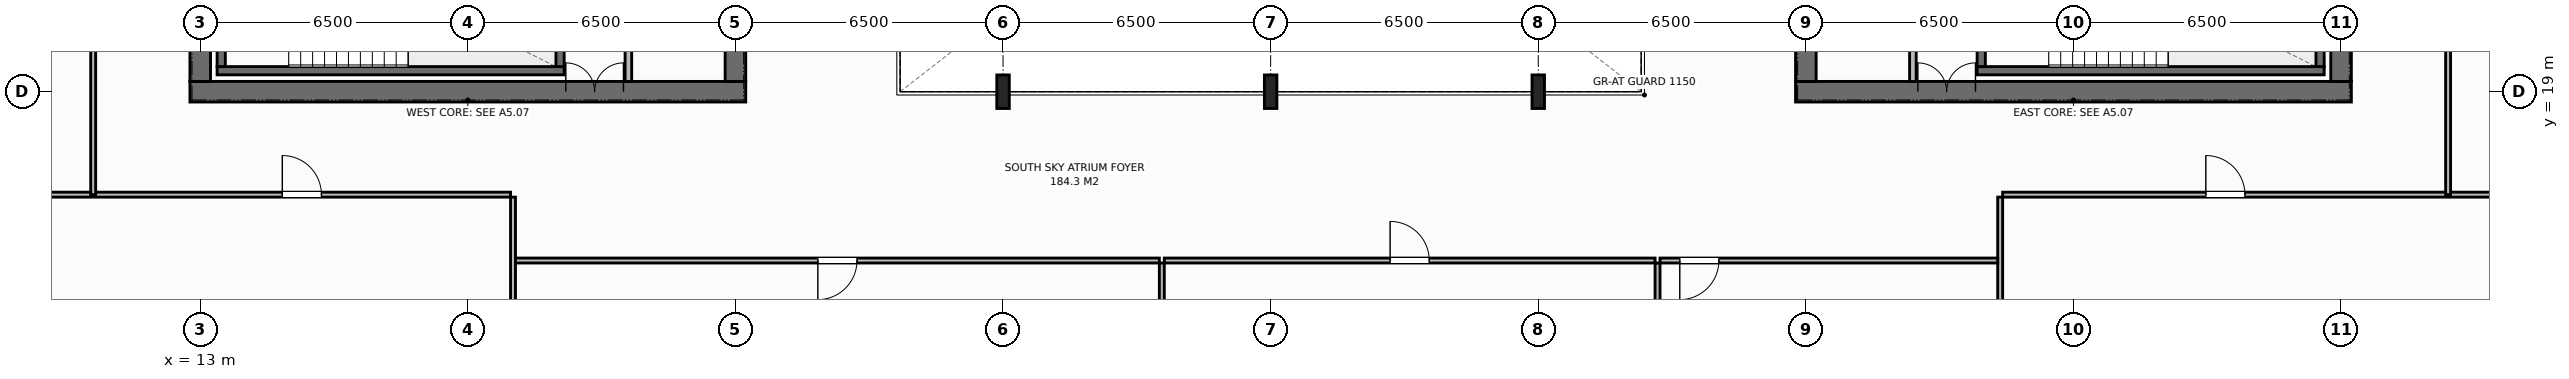
"""IFC4 building model, lengths in metres.
Left out: names, types, materials, properties, quantities, classifications, styles, units other than length and angle.
Written with IfcOpenShell. Run it as: python <this file> out.ifc"""

import sys

from ifc_helpers import new_model, si_unit, direction, frame, frame_2d, origin, origin_2d, place, context, subcontext, project, spatial, rectangle, i_section, extrude, element, fill, save


model = new_model("IFC4")
c1 = context("Model", 3, precision=1e-05, world=origin(), true_north=direction((0.0, 1.0)))
c2 = subcontext(c1, "Body", "Model", "MODEL_VIEW")
j1 = project(units=[si_unit("LENGTHUNIT", "METRE"), si_unit("PLANEANGLEUNIT", "RADIAN")], contexts=[c1])
p1 = place(None, origin())
s1 = spatial("IfcSite", under=j1, at=p1, CompositionType="ELEMENT")
p2 = place(p1, origin())
s2 = spatial("IfcBuilding", under=s1, at=p2, CompositionType="ELEMENT")
p3 = place(p2, frame((0.0, 0.0, 255.6)))
s3 = spatial("IfcBuildingStorey", under=s2, at=p3, CompositionType="ELEMENT", Elevation=255.6)
p4 = place(p3, frame((12.75, 19.0, 0.0), z_axis=(0.0, 0.0, 1.0), x_axis=(1.0, 0.0, 0.0)))
e1 = element("IfcWall", 1, at=p4, inside=s3, PredefinedType="SHEAR", context=c2, shape_type="SweptSolid", body=[
    extrude(rectangle(XDim=13.5, YDim=0.5, at=frame_2d((6.75, 0.0))), origin(), (0.0, 0.0, 1.0), 3.8),
])
p5 = place(p4, frame((9.13, 0.0, 0.0)))
e2 = element("IfcOpeningElement", 2, at=p5, cuts=e1, PredefinedType="OPENING", context=c2, shape_type="SweptSolid", body=[
    extrude(rectangle(XDim=1.4, YDim=2.2, at=frame_2d((0.7, 1.1))), frame((0.0, 0.26, 0.0), z_axis=(0.0, -1.0, 0.0), x_axis=(1.0, 0.0, 0.0)), (0.0, 0.0, 1.0), 0.52),
])
p6 = place(p3, frame((13.0, 19.25, 0.0), z_axis=(0.0, 0.0, 1.0), x_axis=(0.0, 1.0, 0.0)))
e3 = element("IfcWall", 3, at=p6, inside=s3, PredefinedType="SHEAR", context=c2, shape_type="SweptSolid", body=[
    extrude(rectangle(XDim=13.5, YDim=0.5, at=frame_2d((6.75, 0.0))), origin(), (0.0, 0.0, 1.0), 3.8),
])
p7 = place(p6, frame((4.8, 0.0, 0.0)))
e4 = element("IfcOpeningElement", 4, at=p7, cuts=e3, PredefinedType="OPENING", context=c2, shape_type="SweptSolid", body=[
    extrude(rectangle(XDim=1.4, YDim=2.2, at=frame_2d((0.7, 1.1))), frame((0.0, 0.26, 0.0), z_axis=(0.0, -1.0, 0.0), x_axis=(1.0, 0.0, 0.0)), (0.0, 0.0, 1.0), 0.52),
])
p8 = place(p3, frame((26.0, 19.25, 0.0), z_axis=(0.0, 0.0, 1.0), x_axis=(0.0, 1.0, 0.0)))
e5 = element("IfcWall", 5, at=p8, inside=s3, PredefinedType="SHEAR", context=c2, shape_type="SweptSolid", body=[
    extrude(rectangle(XDim=13.5, YDim=0.5, at=frame_2d((6.75, 0.0))), origin(), (0.0, 0.0, 1.0), 3.8),
])
p9 = place(p3, frame((51.75, 19.0, 0.0), z_axis=(0.0, 0.0, 1.0), x_axis=(1.0, 0.0, 0.0)))
e6 = element("IfcWall", 6, at=p9, inside=s3, PredefinedType="SHEAR", context=c2, shape_type="SweptSolid", body=[
    extrude(rectangle(XDim=13.5, YDim=0.5, at=frame_2d((6.75, 0.0))), origin(), (0.0, 0.0, 1.0), 3.8),
])
p10 = place(p9, frame((2.97, 0.0, 0.0)))
e7 = element("IfcOpeningElement", 7, at=p10, cuts=e6, PredefinedType="OPENING", context=c2, shape_type="SweptSolid", body=[
    extrude(rectangle(XDim=1.4, YDim=2.2, at=frame_2d((0.7, 1.1))), frame((0.0, 0.26, 0.0), z_axis=(0.0, -1.0, 0.0), x_axis=(1.0, 0.0, 0.0)), (0.0, 0.0, 1.0), 0.52),
])
p11 = place(p3, frame((52.0, 19.25, 0.0), z_axis=(0.0, 0.0, 1.0), x_axis=(0.0, 1.0, 0.0)))
e8 = element("IfcWall", 8, at=p11, inside=s3, PredefinedType="SHEAR", context=c2, shape_type="SweptSolid", body=[
    extrude(rectangle(XDim=13.5, YDim=0.5, at=frame_2d((6.75, 0.0))), origin(), (0.0, 0.0, 1.0), 3.8),
])
p12 = place(p3, frame((65.0, 19.25, 0.0), z_axis=(0.0, 0.0, 1.0), x_axis=(0.0, 1.0, 0.0)))
e9 = element("IfcWall", 9, at=p12, inside=s3, PredefinedType="SHEAR", context=c2, shape_type="SweptSolid", body=[
    extrude(rectangle(XDim=13.5, YDim=0.5, at=frame_2d((6.75, 0.0))), origin(), (0.0, 0.0, 1.0), 3.8),
])
p13 = place(p12, frame((8.2, 0.0, 0.0)))
e10 = element("IfcOpeningElement", 10, at=p13, cuts=e9, PredefinedType="OPENING", context=c2, shape_type="SweptSolid", body=[
    extrude(rectangle(XDim=1.3, YDim=2.2, at=frame_2d((0.65, 1.1))), frame((0.0, 0.26, 0.0), z_axis=(0.0, -1.0, 0.0), x_axis=(1.0, 0.0, 0.0)), (0.0, 0.0, 1.0), 0.52),
])
p14 = place(p3, frame((13.41, 19.51, 0.0), z_axis=(0.0, 0.0, 1.0), x_axis=(1.0, 0.0, 0.0)))
e11 = element("IfcWall", 11, at=p14, inside=s3, PredefinedType="SHEAR", context=c2, shape_type="SweptSolid", body=[
    extrude(rectangle(XDim=8.43, YDim=0.2, at=frame_2d((4.215, 0.0))), origin(), (0.0, 0.0, 1.0), 3.8),
])
for number, where, z_axis, x_axis in (
    (12, (13.51, 19.61, 0.0), (0.0, 0.0, 1.0), (0.0, 1.0, 0.0)),
    (13, (21.74, 19.61, 0.0), (0.0, 0.0, 1.0), (0.0, 1.0, 0.0)),
):
    element("IfcWall", number, at=place(p3, frame(where, z_axis=z_axis, x_axis=x_axis)), inside=s3, PredefinedType="SHEAR", context=c2, shape_type="SweptSolid", body=[
        extrude(rectangle(XDim=3.28, YDim=0.2, at=frame_2d((1.64, 0.0))), origin(), (0.0, 0.0, 1.0), 3.8),
    ])
p15 = place(p3, frame((56.16, 19.51, 0.0), z_axis=(0.0, 0.0, 1.0), x_axis=(1.0, 0.0, 0.0)))
e14 = element("IfcWall", 14, at=p15, inside=s3, PredefinedType="SHEAR", context=c2, shape_type="SweptSolid", body=[
    extrude(rectangle(XDim=8.43, YDim=0.2, at=frame_2d((4.215, 0.0))), origin(), (0.0, 0.0, 1.0), 3.8),
])
for number, where, z_axis, x_axis in (
    (15, (56.26, 19.61, 0.0), (0.0, 0.0, 1.0), (0.0, 1.0, 0.0)),
    (16, (64.49, 19.61, 0.0), (0.0, 0.0, 1.0), (0.0, 1.0, 0.0)),
):
    element("IfcWall", number, at=place(p3, frame(where, z_axis=z_axis, x_axis=x_axis)), inside=s3, PredefinedType="SHEAR", context=c2, shape_type="SweptSolid", body=[
        extrude(rectangle(XDim=3.28, YDim=0.2, at=frame_2d((1.64, 0.0))), origin(), (0.0, 0.0, 1.0), 3.8),
    ])
for number, where, z_axis, x_axis in (
    (17, (32.5, 19.0, 0.0), (0.0, 0.0, 1.0), (1.0, 0.0, 0.0)),
    (18, (39.0, 19.0, 0.0), (0.0, 0.0, 1.0), (1.0, 0.0, 0.0)),
    (19, (45.5, 19.0, 0.0), (0.0, 0.0, 1.0), (1.0, 0.0, 0.0)),
):
    element("IfcColumn", number, at=place(p3, frame(where, z_axis=z_axis, x_axis=x_axis)), inside=s3, PredefinedType="COLUMN", context=c2, shape_type="SweptSolid", body=[
        extrude(i_section(OverallWidth=0.303, OverallDepth=0.814, WebThickness=0.021, FlangeThickness=0.04, at=origin_2d()), origin(), (0.0, 0.0, 1.0), 3.8),
    ])
p16 = place(p3, frame((23.4, 19.25, 0.0), z_axis=(0.0, 0.0, 1.0), x_axis=(0.0, 1.0, 0.0)))
e20 = element("IfcWall", 20, at=p16, inside=s3, PredefinedType="STANDARD", context=c2, shape_type="SweptSolid", body=[
    extrude(rectangle(XDim=13.5, YDim=0.16, at=frame_2d((6.75, 0.0))), origin(), (0.0, 0.0, 1.0), 3.588),
])
p17 = place(p16, frame((2.25, 0.0, 0.0)))
e21 = element("IfcOpeningElement", 21, at=p17, cuts=e20, PredefinedType="OPENING", context=c2, shape_type="SweptSolid", body=[
    extrude(rectangle(XDim=0.95, YDim=2.15, at=frame_2d((0.475, 1.075))), frame((0.0, 0.09, 0.0), z_axis=(0.0, -1.0, 0.0), x_axis=(1.0, 0.0, 0.0)), (0.0, 0.0, 1.0), 0.18),
])
p18 = place(p16, frame((6.35, 0.0, 0.0)))
e22 = element("IfcOpeningElement", 22, at=p18, cuts=e20, PredefinedType="OPENING", context=c2, shape_type="SweptSolid", body=[
    extrude(rectangle(XDim=0.95, YDim=2.15, at=frame_2d((0.475, 1.075))), frame((0.0, 0.09, 0.0), z_axis=(0.0, -1.0, 0.0), x_axis=(1.0, 0.0, 0.0)), (0.0, 0.0, 1.0), 0.18),
])
p19 = place(p16, frame((9.35, 0.0, 0.0)))
e23 = element("IfcOpeningElement", 23, at=p19, cuts=e20, PredefinedType="OPENING", context=c2, shape_type="SweptSolid", body=[
    extrude(rectangle(XDim=1.1, YDim=2.2, at=frame_2d((0.55, 1.1))), frame((0.0, 0.09, 0.0), z_axis=(0.0, -1.0, 0.0), x_axis=(1.0, 0.0, 0.0)), (0.0, 0.0, 1.0), 0.18),
])
p20 = place(p16, frame((11.55, 0.0, 0.0)))
e24 = element("IfcOpeningElement", 24, at=p20, cuts=e20, PredefinedType="OPENING", context=c2, shape_type="SweptSolid", body=[
    extrude(rectangle(XDim=1.1, YDim=2.2, at=frame_2d((0.55, 1.1))), frame((0.0, 0.09, 0.0), z_axis=(0.0, -1.0, 0.0), x_axis=(1.0, 0.0, 0.0)), (0.0, 0.0, 1.0), 0.18),
])
p21 = place(p3, frame((54.6, 19.25, 0.0), z_axis=(0.0, 0.0, 1.0), x_axis=(0.0, 1.0, 0.0)))
e25 = element("IfcWall", 25, at=p21, inside=s3, PredefinedType="STANDARD", context=c2, shape_type="SweptSolid", body=[
    extrude(rectangle(XDim=13.5, YDim=0.16, at=frame_2d((6.75, 0.0))), origin(), (0.0, 0.0, 1.0), 3.588),
])
p22 = place(p21, frame((2.15, 0.0, 0.0)))
e26 = element("IfcOpeningElement", 26, at=p22, cuts=e25, PredefinedType="OPENING", context=c2, shape_type="SweptSolid", body=[
    extrude(rectangle(XDim=0.95, YDim=2.15, at=frame_2d((0.475, 1.075))), frame((0.0, 0.09, 0.0), z_axis=(0.0, -1.0, 0.0), x_axis=(1.0, 0.0, 0.0)), (0.0, 0.0, 1.0), 0.18),
])
p23 = place(p21, frame((6.25, 0.0, 0.0)))
e27 = element("IfcOpeningElement", 27, at=p23, cuts=e25, PredefinedType="OPENING", context=c2, shape_type="SweptSolid", body=[
    extrude(rectangle(XDim=0.95, YDim=2.15, at=frame_2d((0.475, 1.075))), frame((0.0, 0.09, 0.0), z_axis=(0.0, -1.0, 0.0), x_axis=(1.0, 0.0, 0.0)), (0.0, 0.0, 1.0), 0.18),
])
p24 = place(p21, frame((9.35, 0.0, 0.0)))
e28 = element("IfcOpeningElement", 28, at=p24, cuts=e25, PredefinedType="OPENING", context=c2, shape_type="SweptSolid", body=[
    extrude(rectangle(XDim=1.1, YDim=2.2, at=frame_2d((0.55, 1.1))), frame((0.0, 0.09, 0.0), z_axis=(0.0, -1.0, 0.0), x_axis=(1.0, 0.0, 0.0)), (0.0, 0.0, 1.0), 0.18),
])
p25 = place(p21, frame((11.55, 0.0, 0.0)))
e29 = element("IfcOpeningElement", 29, at=p25, cuts=e25, PredefinedType="OPENING", context=c2, shape_type="SweptSolid", body=[
    extrude(rectangle(XDim=1.1, YDim=2.2, at=frame_2d((0.55, 1.1))), frame((0.0, 0.09, 0.0), z_axis=(0.0, -1.0, 0.0), x_axis=(1.0, 0.0, 0.0)), (0.0, 0.0, 1.0), 0.18),
])
p26 = place(p3, frame((20.597, 5.12, 0.0), z_axis=(0.0, 0.0, 1.0), x_axis=(0.0, 1.0, 0.0)))
e30 = element("IfcWall", 30, at=p26, inside=s3, PredefinedType="PARTITIONING", context=c2, shape_type="SweptSolid", body=[
    extrude(rectangle(XDim=11.32, YDim=0.12, at=frame_2d((5.66, 0.0))), origin(), (0.0, 0.0, 1.0), 3.588),
])
p27 = place(p3, frame((7.38, 16.5, 0.0), z_axis=(0.0, 0.0, 1.0), x_axis=(1.0, 0.0, 0.0)))
e31 = element("IfcWall", 31, at=p27, inside=s3, PredefinedType="PARTITIONING", context=c2, shape_type="SweptSolid", body=[
    extrude(rectangle(XDim=13.157, YDim=0.12, at=frame_2d((6.579, 0.0))), origin(), (0.0, 0.0, 1.0), 3.588),
])
p28 = place(p27, frame((7.614, 0.0, 0.0)))
e32 = element("IfcOpeningElement", 32, at=p28, cuts=e31, PredefinedType="OPENING", context=c2, shape_type="SweptSolid", body=[
    extrude(rectangle(XDim=0.95, YDim=2.15, at=frame_2d((0.475, 1.075))), frame((0.0, 0.07, 0.0), z_axis=(0.0, -1.0, 0.0), x_axis=(1.0, 0.0, 0.0)), (0.0, 0.0, 1.0), 0.14),
])
p29 = place(p3, frame((36.357, 5.12, 0.0), z_axis=(0.0, 0.0, 1.0), x_axis=(0.0, 1.0, 0.0)))
e33 = element("IfcWall", 33, at=p29, inside=s3, PredefinedType="PARTITIONING", context=c2, shape_type="SweptSolid", body=[
    extrude(rectangle(XDim=9.72, YDim=0.12, at=frame_2d((4.86, 0.0))), origin(), (0.0, 0.0, 1.0), 3.588),
])
p30 = place(p3, frame((20.657, 14.9, 0.0), z_axis=(0.0, 0.0, 1.0), x_axis=(1.0, 0.0, 0.0)))
e34 = element("IfcWall", 34, at=p30, inside=s3, PredefinedType="PARTITIONING", context=c2, shape_type="SweptSolid", body=[
    extrude(rectangle(XDim=15.639, YDim=0.12, at=frame_2d((7.82, 0.0))), origin(), (0.0, 0.0, 1.0), 3.588),
])
p31 = place(p30, frame((7.345, 0.0, 0.0)))
e35 = element("IfcOpeningElement", 35, at=p31, cuts=e34, PredefinedType="OPENING", context=c2, shape_type="SweptSolid", body=[
    extrude(rectangle(XDim=0.95, YDim=2.15, at=frame_2d((0.475, 1.075))), frame((0.0, 0.07, 0.0), z_axis=(0.0, -1.0, 0.0), x_axis=(1.0, 0.0, 0.0)), (0.0, 0.0, 1.0), 0.14),
])
p32 = place(p3, frame((48.397, 5.12, 0.0), z_axis=(0.0, 0.0, 1.0), x_axis=(0.0, 1.0, 0.0)))
e36 = element("IfcWall", 36, at=p32, inside=s3, PredefinedType="PARTITIONING", context=c2, shape_type="SweptSolid", body=[
    extrude(rectangle(XDim=9.72, YDim=0.12, at=frame_2d((4.86, 0.0))), origin(), (0.0, 0.0, 1.0), 3.588),
])
p33 = place(p3, frame((36.417, 14.9, 0.0), z_axis=(0.0, 0.0, 1.0), x_axis=(1.0, 0.0, 0.0)))
e37 = element("IfcWall", 37, at=p33, inside=s3, PredefinedType="PARTITIONING", context=c2, shape_type="SweptSolid", body=[
    extrude(rectangle(XDim=11.921, YDim=0.12, at=frame_2d((5.96, 0.0))), origin(), (0.0, 0.0, 1.0), 3.588),
])
p34 = place(p33, frame((5.485, 0.0, 0.0)))
e38 = element("IfcOpeningElement", 38, at=p34, cuts=e37, PredefinedType="OPENING", context=c2, shape_type="SweptSolid", body=[
    extrude(rectangle(XDim=0.95, YDim=2.15, at=frame_2d((0.475, 1.075))), frame((0.0, 0.07, 0.0), z_axis=(0.0, -1.0, 0.0), x_axis=(1.0, 0.0, 0.0)), (0.0, 0.0, 1.0), 0.14),
])
p35 = place(p3, frame((56.72, 5.12, 0.0), z_axis=(0.0, 0.0, 1.0), x_axis=(0.0, 1.0, 0.0)))
e39 = element("IfcWall", 39, at=p35, inside=s3, PredefinedType="PARTITIONING", context=c2, shape_type="SweptSolid", body=[
    extrude(rectangle(XDim=11.32, YDim=0.12, at=frame_2d((5.66, 0.0))), origin(), (0.0, 0.0, 1.0), 3.588),
])
p36 = place(p3, frame((48.458, 14.9, 0.0), z_axis=(0.0, 0.0, 1.0), x_axis=(1.0, 0.0, 0.0)))
e40 = element("IfcWall", 40, at=p36, inside=s3, PredefinedType="PARTITIONING", context=c2, shape_type="SweptSolid", body=[
    extrude(rectangle(XDim=8.202, YDim=0.12, at=frame_2d((4.101, 0.0))), origin(), (0.0, 0.0, 1.0), 3.588),
])
p37 = place(p36, frame((0.48, 0.0, 0.0)))
e41 = element("IfcOpeningElement", 41, at=p37, cuts=e40, PredefinedType="OPENING", context=c2, shape_type="SweptSolid", body=[
    extrude(rectangle(XDim=0.95, YDim=2.15, at=frame_2d((0.475, 1.075))), frame((0.0, 0.07, 0.0), z_axis=(0.0, -1.0, 0.0), x_axis=(1.0, 0.0, 0.0)), (0.0, 0.0, 1.0), 0.14),
])
p38 = place(p3, frame((56.78, 16.5, 0.0), z_axis=(0.0, 0.0, 1.0), x_axis=(1.0, 0.0, 0.0)))
e42 = element("IfcWall", 42, at=p38, inside=s3, PredefinedType="PARTITIONING", context=c2, shape_type="SweptSolid", body=[
    extrude(rectangle(XDim=13.84, YDim=0.12, at=frame_2d((6.92, 0.0))), origin(), (0.0, 0.0, 1.0), 3.588),
])
p39 = place(p38, frame((4.935, 0.0, 0.0)))
e43 = element("IfcOpeningElement", 43, at=p39, cuts=e42, PredefinedType="OPENING", context=c2, shape_type="SweptSolid", body=[
    extrude(rectangle(XDim=0.95, YDim=2.15, at=frame_2d((0.475, 1.075))), frame((0.0, 0.07, 0.0), z_axis=(0.0, -1.0, 0.0), x_axis=(1.0, 0.0, 0.0)), (0.0, 0.0, 1.0), 0.14),
])
p40 = place(p3, frame((10.4, 16.5, 0.0), z_axis=(0.0, 0.0, 1.0), x_axis=(0.0, 1.0, 0.0)))
e44 = element("IfcWall", 44, at=p40, inside=s3, PredefinedType="PARTITIONING", context=c2, shape_type="SweptSolid", body=[
    extrude(rectangle(XDim=6.333, YDim=0.12, at=frame_2d((3.167, 0.0))), origin(), (0.0, 0.0, 1.0), 3.588),
])
p41 = place(p40, frame((3.742, 0.0, 0.0)))
e45 = element("IfcOpeningElement", 45, at=p41, cuts=e44, PredefinedType="OPENING", context=c2, shape_type="SweptSolid", body=[
    extrude(rectangle(XDim=0.95, YDim=2.15, at=frame_2d((0.475, 1.075))), frame((0.0, 0.07, 0.0), z_axis=(0.0, -1.0, 0.0), x_axis=(1.0, 0.0, 0.0)), (0.0, 0.0, 1.0), 0.14),
])
p42 = place(p3, frame((67.6, 16.5, 0.0), z_axis=(0.0, 0.0, 1.0), x_axis=(0.0, 1.0, 0.0)))
e46 = element("IfcWall", 46, at=p42, inside=s3, PredefinedType="PARTITIONING", context=c2, shape_type="SweptSolid", body=[
    extrude(rectangle(XDim=19.0, YDim=0.12, at=frame_2d((9.5, 0.0))), origin(), (0.0, 0.0, 1.0), 3.588),
])
p43 = place(p42, frame((9.025, 0.0, 0.0)))
e47 = element("IfcOpeningElement", 47, at=p43, cuts=e46, PredefinedType="OPENING", context=c2, shape_type="SweptSolid", body=[
    extrude(rectangle(XDim=0.95, YDim=2.15, at=frame_2d((0.475, 1.075))), frame((0.0, 0.07, 0.0), z_axis=(0.0, -1.0, 0.0), x_axis=(1.0, 0.0, 0.0)), (0.0, 0.0, 1.0), 0.14),
])
p44 = place(p5, origin())
e48 = element("IfcDoor", 48, at=p44, inside=s3, OperationType="DOUBLE_DOOR_SINGLE_SWING", PredefinedType="DOOR", context=c2, shape_type="SweptSolid", body=[
    extrude(rectangle(XDim=1.4, YDim=2.2, at=frame_2d((0.7, 1.1))), frame((0.0, 0.075, 0.0), z_axis=(0.0, -1.0, 0.0), x_axis=(1.0, 0.0, 0.0)), (0.0, 0.0, 1.0), 0.05),
])
fill(e2, e48)
p45 = place(p10, origin())
e49 = element("IfcDoor", 49, at=p45, inside=s3, OperationType="DOUBLE_DOOR_SINGLE_SWING", PredefinedType="DOOR", context=c2, shape_type="SweptSolid", body=[
    extrude(rectangle(XDim=1.4, YDim=2.2, at=frame_2d((0.7, 1.1))), frame((0.0, 0.075, 0.0), z_axis=(0.0, -1.0, 0.0), x_axis=(1.0, 0.0, 0.0)), (0.0, 0.0, 1.0), 0.05),
])
fill(e7, e49)
p46 = place(p28, origin())
e50 = element("IfcDoor", 50, at=p46, inside=s3, OperationType="SINGLE_SWING_LEFT", PredefinedType="DOOR", context=c2, shape_type="SweptSolid", body=[
    extrude(rectangle(XDim=0.95, YDim=2.15, at=frame_2d((0.475, 1.075))), frame((0.0, 0.025, 0.0), z_axis=(0.0, -1.0, 0.0), x_axis=(1.0, 0.0, 0.0)), (0.0, 0.0, 1.0), 0.05),
])
fill(e32, e50)
p47 = place(p31, origin())
e51 = element("IfcDoor", 51, at=p47, inside=s3, OperationType="SINGLE_SWING_RIGHT", PredefinedType="DOOR", context=c2, shape_type="SweptSolid", body=[
    extrude(rectangle(XDim=0.95, YDim=2.15, at=frame_2d((0.475, 1.075))), frame((0.0, 0.025, 0.0), z_axis=(0.0, -1.0, 0.0), x_axis=(1.0, 0.0, 0.0)), (0.0, 0.0, 1.0), 0.05),
])
fill(e35, e51)
p48 = place(p34, origin())
e52 = element("IfcDoor", 52, at=p48, inside=s3, OperationType="SINGLE_SWING_LEFT", PredefinedType="DOOR", context=c2, shape_type="SweptSolid", body=[
    extrude(rectangle(XDim=0.95, YDim=2.15, at=frame_2d((0.475, 1.075))), frame((0.0, 0.025, 0.0), z_axis=(0.0, -1.0, 0.0), x_axis=(1.0, 0.0, 0.0)), (0.0, 0.0, 1.0), 0.05),
])
fill(e38, e52)
p49 = place(p37, origin())
e53 = element("IfcDoor", 53, at=p49, inside=s3, OperationType="SINGLE_SWING_RIGHT", PredefinedType="DOOR", context=c2, shape_type="SweptSolid", body=[
    extrude(rectangle(XDim=0.95, YDim=2.15, at=frame_2d((0.475, 1.075))), frame((0.0, 0.025, 0.0), z_axis=(0.0, -1.0, 0.0), x_axis=(1.0, 0.0, 0.0)), (0.0, 0.0, 1.0), 0.05),
])
fill(e41, e53)
p50 = place(p39, origin())
e54 = element("IfcDoor", 54, at=p50, inside=s3, OperationType="SINGLE_SWING_LEFT", PredefinedType="DOOR", context=c2, shape_type="SweptSolid", body=[
    extrude(rectangle(XDim=0.95, YDim=2.15, at=frame_2d((0.475, 1.075))), frame((0.0, 0.025, 0.0), z_axis=(0.0, -1.0, 0.0), x_axis=(1.0, 0.0, 0.0)), (0.0, 0.0, 1.0), 0.05),
])
fill(e43, e54)
save(model, sys.argv[1])
